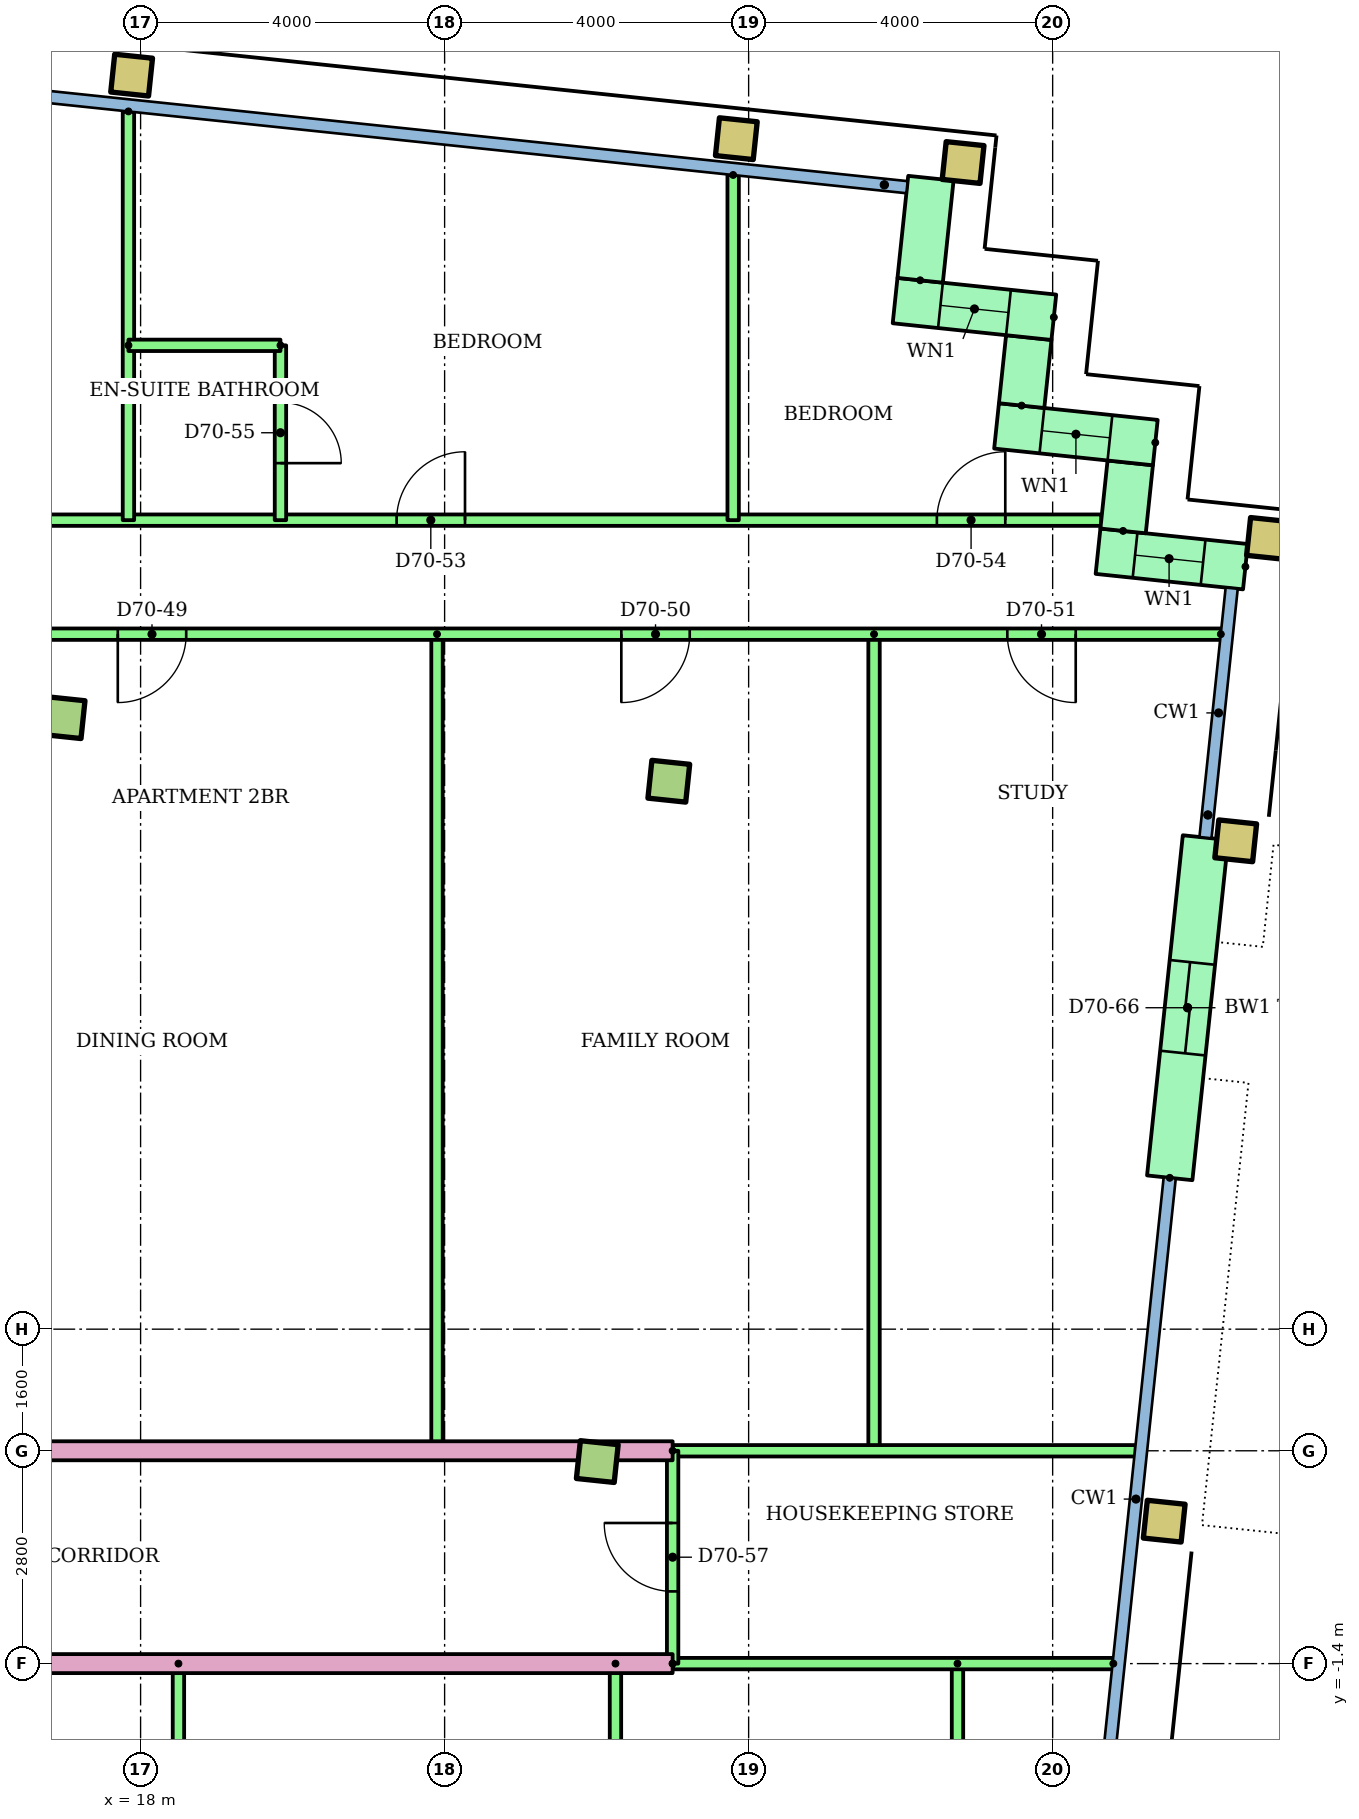
"""IFC4 building model, lengths in metres.
Left out: names, types, materials, properties, quantities, classifications, styles, units other than length and angle.
Written with IfcOpenShell. Run it as: python <this file> out.ifc"""

import sys

from ifc_helpers import new_model, si_unit, direction, frame, frame_2d, origin, origin_2d, place, context, subcontext, project, spatial, rectangle, hollow_rectangle, extrude, element, fill, save


model = new_model("IFC4")
c1 = context("Model", 3, precision=1e-05, world=origin(), true_north=direction((0.0, 1.0)))
c2 = subcontext(c1, "Body", "Model", "MODEL_VIEW")
j1 = project(units=[si_unit("LENGTHUNIT", "METRE"), si_unit("PLANEANGLEUNIT", "RADIAN")], contexts=[c1])
p1 = place(None, origin())
s1 = spatial("IfcSite", under=j1, at=p1, CompositionType="ELEMENT")
p2 = place(p1, origin())
s2 = spatial("IfcBuilding", under=s1, at=p2, CompositionType="ELEMENT")
p3 = place(p2, frame((0.0, 0.0, 269.1)))
s3 = spatial("IfcBuildingStorey", under=s2, at=p3, CompositionType="ELEMENT", Elevation=269.1)
p4 = place(p3, frame((24.009, 1.258, 0.0), z_axis=(0.0, 0.0, 1.0), x_axis=(0.994521895368, -0.104528463268, 0.0)))
e1 = element("IfcColumn", 1, at=p4, inside=s3, PredefinedType="COLUMN", context=c2, shape_type="SweptSolid", body=[
    extrude(rectangle(XDim=0.5, YDim=0.5, at=origin_2d()), origin(), (0.0, 0.0, 1.0), 3.2),
])
p5 = place(p3, frame((31.468, 0.474, 0.0), z_axis=(0.0, 0.0, 1.0), x_axis=(0.994521895368, -0.104528463268, 0.0)))
e2 = element("IfcColumn", 2, at=p5, inside=s3, PredefinedType="COLUMN", context=c2, shape_type="SweptSolid", body=[
    extrude(hollow_rectangle(XDim=0.5, YDim=0.5, WallThickness=0.025, at=origin_2d()), origin(), (0.0, 0.0, 1.0), 3.2),
])
for number, where, z_axis, x_axis in (
    (3, (16.993, 11.045, 0.0), (0.0, 0.0, 1.0), (0.995, -0.105, 0.0)),
    (4, (24.95, 10.209, 0.0), (0.0, 0.0, 1.0), (0.995, -0.105, 0.0)),
):
    element("IfcColumn", number, at=place(p3, frame(where, z_axis=z_axis, x_axis=x_axis)), inside=s3, PredefinedType="COLUMN", context=c2, shape_type="SweptSolid", body=[
        extrude(rectangle(XDim=0.5, YDim=0.5, at=origin_2d()), origin(), (0.0, 0.0, 1.0), 3.2),
    ])
for number, where, z_axis, x_axis in (
    (5, (32.409, 9.425, 0.0), (0.0, 0.0, 1.0), (0.995, -0.105, 0.0)),
    (6, (32.827, 13.403, 0.0), (0.0, 0.0, 1.0), (0.995, -0.105, 0.0)),
    (7, (17.882, 19.498, 0.0), (0.0, 0.0, 1.0), (0.995, -0.105, 0.0)),
    (8, (25.838, 18.662, 0.0), (0.0, 0.0, 1.0), (0.995, -0.105, 0.0)),
    (9, (28.822, 18.349, 0.0), (0.0, 0.0, 1.0), (0.995, -0.105, 0.0)),
):
    element("IfcColumn", number, at=place(p3, frame(where, z_axis=z_axis, x_axis=x_axis)), inside=s3, PredefinedType="COLUMN", context=c2, shape_type="SweptSolid", body=[
        extrude(hollow_rectangle(XDim=0.5, YDim=0.5, WallThickness=0.025, at=origin_2d()), origin(), (0.0, 0.0, 1.0), 3.2),
    ])
p6 = place(p3, frame((32.536, 13.031, 0.0), z_axis=(0.0, 0.0, 1.0), x_axis=(-0.994534226826, 0.104411070641, 0.0)))
e10 = element("IfcWall", 10, at=p6, inside=s3, PredefinedType="STANDARD", context=c2, shape_type="SweptSolid", body=[
    extrude(rectangle(XDim=1.95, YDim=0.6, at=frame_2d((0.975, 0.0))), origin(), (0.0, 0.0, 1.0), 2.92),
])
p7 = place(p6, frame((0.56, 0.0, 0.9)))
e11 = element("IfcOpeningElement", 11, at=p7, cuts=e10, PredefinedType="OPENING", context=c2, shape_type="SweptSolid", body=[
    extrude(rectangle(XDim=0.9, YDim=1.5, at=frame_2d((0.45, 0.75))), frame((0.0, 0.31, 0.0), z_axis=(0.0, -1.0, 0.0), x_axis=(1.0, 0.0, 0.0)), (0.0, 0.0, 1.0), 0.62),
])
p8 = place(p3, frame((30.927, 13.502, 0.0), z_axis=(0.0, 0.0, 1.0), x_axis=(0.104416541099, 0.994533652495, 0.0)))
e12 = element("IfcWall", 12, at=p8, inside=s3, PredefinedType="STANDARD", context=c2, shape_type="SweptSolid", body=[
    extrude(rectangle(XDim=0.9, YDim=0.6, at=frame_2d((0.45, 0.0))), origin(), (0.0, 0.0, 1.0), 2.92),
])
p9 = place(p3, frame((31.351, 14.664, 0.0), z_axis=(0.0, 0.0, 1.0), x_axis=(-0.994523910136, 0.104509292252, 0.0)))
e13 = element("IfcWall", 13, at=p9, inside=s3, PredefinedType="STANDARD", context=c2, shape_type="SweptSolid", body=[
    extrude(rectangle(XDim=2.1, YDim=0.6, at=frame_2d((1.05, 0.0))), origin(), (0.0, 0.0, 1.0), 2.92),
])
p10 = place(p9, frame((0.6, 0.0, 0.9)))
e14 = element("IfcOpeningElement", 14, at=p10, cuts=e13, PredefinedType="OPENING", context=c2, shape_type="SweptSolid", body=[
    extrude(rectangle(XDim=0.9, YDim=1.5, at=frame_2d((0.45, 0.75))), frame((0.0, 0.31, 0.0), z_axis=(0.0, -1.0, 0.0), x_axis=(1.0, 0.0, 0.0)), (0.0, 0.0, 1.0), 0.62),
])
p11 = place(p3, frame((29.592, 15.151, 0.0), z_axis=(0.0, 0.0, 1.0), x_axis=(0.104444712852, 0.994530694326, 0.0)))
e15 = element("IfcWall", 15, at=p11, inside=s3, PredefinedType="STANDARD", context=c2, shape_type="SweptSolid", body=[
    extrude(rectangle(XDim=0.9, YDim=0.6, at=frame_2d((0.45, 0.0))), origin(), (0.0, 0.0, 1.0), 2.92),
])
p12 = place(p3, frame((30.015, 16.312, 0.0), z_axis=(0.0, 0.0, 1.0), x_axis=(-0.994510548187, 0.104636368175, 0.0)))
e16 = element("IfcWall", 16, at=p12, inside=s3, PredefinedType="STANDARD", context=c2, shape_type="SweptSolid", body=[
    extrude(rectangle(XDim=2.1, YDim=0.6, at=frame_2d((1.05, 0.0))), origin(), (0.0, 0.0, 1.0), 2.92),
])
p13 = place(p12, frame((0.6, 0.0, 0.9)))
e17 = element("IfcOpeningElement", 17, at=p13, cuts=e16, PredefinedType="OPENING", context=c2, shape_type="SweptSolid", body=[
    extrude(rectangle(XDim=0.9, YDim=1.5, at=frame_2d((0.45, 0.75))), frame((0.0, 0.31, 0.0), z_axis=(0.0, -1.0, 0.0), x_axis=(1.0, 0.0, 0.0)), (0.0, 0.0, 1.0), 0.62),
])
p14 = place(p3, frame((28.257, 16.799, 0.0), z_axis=(0.0, 0.0, 1.0), x_axis=(0.104534153452, 0.994521297289, 0.0)))
e18 = element("IfcWall", 18, at=p14, inside=s3, PredefinedType="STANDARD", context=c2, shape_type="SweptSolid", body=[
    extrude(rectangle(XDim=1.35, YDim=0.6, at=frame_2d((0.675, 0.0))), origin(), (0.0, 0.0, 1.0), 2.92),
])
p15 = place(p3, frame((31.54, 4.991, 0.0), z_axis=(0.0, 0.0, 1.0), x_axis=(0.104546400045, 0.994520009974, 0.0)))
e19 = element("IfcWall", 19, at=p15, inside=s3, PredefinedType="STANDARD", context=c2, shape_type="SweptSolid", body=[
    extrude(rectangle(XDim=4.5, YDim=0.6, at=frame_2d((2.25, 0.0))), origin(), (0.0, 0.0, 1.0), 2.92),
])
p16 = place(p15, frame((1.65, 0.0, 0.0)))
e20 = element("IfcOpeningElement", 20, at=p16, cuts=e19, PredefinedType="OPENING", context=c2, shape_type="SweptSolid", body=[
    extrude(rectangle(XDim=1.2, YDim=2.1, at=frame_2d((0.6, 1.05))), frame((0.0, 0.31, 0.0), z_axis=(0.0, -1.0, 0.0), x_axis=(1.0, 0.0, 0.0)), (0.0, 0.0, 1.0), 0.62),
])
for number, where, z_axis, x_axis in (
    (21, (18.498, -1.4, 0.0), (0.0, 0.0, 1.0), (0.0, -1.0, 0.0)),
    (22, (24.248, -1.4, 0.0), (0.0, 0.0, 1.0), (0.0, -1.0, 0.0)),
    (23, (28.748, -1.4, 0.0), (0.0, 0.0, 1.0), (0.0, -1.0, 0.0)),
):
    element("IfcWall", number, at=place(p3, frame(where, z_axis=z_axis, x_axis=x_axis)), inside=s3, PredefinedType="PARTITIONING", context=c2, shape_type="SweptSolid", body=[
        extrude(rectangle(XDim=8.982, YDim=0.15, at=frame_2d((4.491, 0.0))), origin(), (0.0, 0.0, 1.0), 2.4),
    ])
p17 = place(p3, frame((25.0, -1.4, 0.0), z_axis=(0.0, 0.0, 1.0), x_axis=(-1.0, 0.0, 0.0)))
e24 = element("IfcWall", 24, at=p17, inside=s3, PredefinedType="PARTITIONING", context=c2, shape_type="SweptSolid", body=[
    extrude(rectangle(XDim=15.0, YDim=0.25, at=frame_2d((7.5, 0.0))), origin(), (0.0, 0.0, 1.0), 2.4),
])
p18 = place(p17, frame((9.658, 0.0, 0.0)))
e25 = element("IfcOpeningElement", 25, at=p18, cuts=e24, PredefinedType="OPENING", context=c2, shape_type="SweptSolid", body=[
    extrude(rectangle(XDim=0.9, YDim=2.1, at=frame_2d((0.45, 1.05))), frame((0.0, 0.135, 0.0), z_axis=(0.0, -1.0, 0.0), x_axis=(1.0, 0.0, 0.0)), (0.0, 0.0, 1.0), 0.27),
])
p19 = place(p3, frame((30.798, -1.4, 0.0), z_axis=(0.0, 0.0, 1.0), x_axis=(-1.0, 0.0, 0.0)))
e26 = element("IfcWall", 26, at=p19, inside=s3, PredefinedType="PARTITIONING", context=c2, shape_type="SweptSolid", body=[
    extrude(rectangle(XDim=5.798, YDim=0.15, at=frame_2d((2.899, 0.0))), origin(), (0.0, 0.0, 1.0), 2.4),
])
for number, where, z_axis, x_axis in (
    (27, (21.9, 12.143, 0.0), (0.0, 0.0, 1.0), (0.0, -1.0, 0.0)),
    (28, (27.65, 12.143, 0.0), (0.0, 0.0, 1.0), (0.0, -1.0, 0.0)),
):
    element("IfcWall", number, at=place(p3, frame(where, z_axis=z_axis, x_axis=x_axis)), inside=s3, PredefinedType="PARTITIONING", context=c2, shape_type="SweptSolid", body=[
        extrude(rectangle(XDim=10.743, YDim=0.15, at=frame_2d((5.372, 0.0))), origin(), (0.0, 0.0, 1.0), 2.4),
    ])
p20 = place(p3, frame((32.213, 12.143, 0.0), z_axis=(0.0, 0.0, 1.0), x_axis=(-1.0, 0.0, 0.0)))
e29 = element("IfcWall", 29, at=p20, inside=s3, PredefinedType="PARTITIONING", context=c2, shape_type="SweptSolid", body=[
    extrude(rectangle(XDim=20.213, YDim=0.15, at=frame_2d((10.106, 0.0))), origin(), (0.0, 0.0, 1.0), 2.4),
])
p21 = place(p20, frame((13.613, 0.0, 0.0)))
e30 = element("IfcOpeningElement", 30, at=p21, cuts=e29, PredefinedType="OPENING", context=c2, shape_type="SweptSolid", body=[
    extrude(rectangle(XDim=0.9, YDim=2.1, at=frame_2d((0.45, 1.05))), frame((0.0, 0.085, 0.0), z_axis=(0.0, -1.0, 0.0), x_axis=(1.0, 0.0, 0.0)), (0.0, 0.0, 1.0), 0.17),
])
p22 = place(p20, frame((6.988, 0.0, 0.0)))
e31 = element("IfcOpeningElement", 31, at=p22, cuts=e29, PredefinedType="OPENING", context=c2, shape_type="SweptSolid", body=[
    extrude(rectangle(XDim=0.9, YDim=2.1, at=frame_2d((0.45, 1.05))), frame((0.0, 0.085, 0.0), z_axis=(0.0, -1.0, 0.0), x_axis=(1.0, 0.0, 0.0)), (0.0, 0.0, 1.0), 0.17),
])
p23 = place(p20, frame((1.909, 0.0, 0.0)))
e32 = element("IfcOpeningElement", 32, at=p23, cuts=e29, PredefinedType="OPENING", context=c2, shape_type="SweptSolid", body=[
    extrude(rectangle(XDim=0.9, YDim=2.1, at=frame_2d((0.45, 1.05))), frame((0.0, 0.085, 0.0), z_axis=(0.0, -1.0, 0.0), x_axis=(1.0, 0.0, 0.0)), (0.0, 0.0, 1.0), 0.17),
])
p24 = place(p3, frame((10.0, 13.643, 0.0)))
e33 = element("IfcWall", 33, at=p24, inside=s3, PredefinedType="PARTITIONING", context=c2, shape_type="SweptSolid", body=[
    extrude(rectangle(XDim=20.641, YDim=0.15, at=frame_2d((10.32, 0.0))), origin(), (0.0, 0.0, 1.0), 2.4),
])
p25 = place(p24, frame((3.42, 0.0, 0.0)))
e34 = element("IfcOpeningElement", 34, at=p25, cuts=e33, PredefinedType="OPENING", context=c2, shape_type="SweptSolid", body=[
    extrude(rectangle(XDim=1.0, YDim=2.1, at=frame_2d((0.5, 1.05))), frame((0.0, 0.085, 0.0), z_axis=(0.0, -1.0, 0.0), x_axis=(1.0, 0.0, 0.0)), (0.0, 0.0, 1.0), 0.17),
])
p26 = place(p24, frame((11.368, 0.0, 0.0)))
e35 = element("IfcOpeningElement", 35, at=p26, cuts=e33, PredefinedType="OPENING", context=c2, shape_type="SweptSolid", body=[
    extrude(rectangle(XDim=0.9, YDim=2.1, at=frame_2d((0.45, 1.05))), frame((0.0, 0.085, 0.0), z_axis=(0.0, -1.0, 0.0), x_axis=(1.0, 0.0, 0.0)), (0.0, 0.0, 1.0), 0.17),
])
p27 = place(p24, frame((18.477, 0.0, 0.0)))
e36 = element("IfcOpeningElement", 36, at=p27, cuts=e33, PredefinedType="OPENING", context=c2, shape_type="SweptSolid", body=[
    extrude(rectangle(XDim=0.9, YDim=2.1, at=frame_2d((0.45, 1.05))), frame((0.0, 0.085, 0.0), z_axis=(0.0, -1.0, 0.0), x_axis=(1.0, 0.0, 0.0)), (0.0, 0.0, 1.0), 0.17),
])
p28 = place(p3, frame((17.84, 19.021, 0.0), z_axis=(0.0, 0.0, 1.0), x_axis=(0.0, -1.0, 0.0)))
e37 = element("IfcWall", 37, at=p28, inside=s3, PredefinedType="PARTITIONING", context=c2, shape_type="SweptSolid", body=[
    extrude(rectangle(XDim=5.378, YDim=0.15, at=frame_2d((2.689, 0.0))), origin(), (0.0, 0.0, 1.0), 2.4),
])
p29 = place(p3, frame((25.796, 18.185, 0.0), z_axis=(0.0, 0.0, 1.0), x_axis=(0.0, -1.0, 0.0)))
e38 = element("IfcWall", 38, at=p29, inside=s3, PredefinedType="PARTITIONING", context=c2, shape_type="SweptSolid", body=[
    extrude(rectangle(XDim=4.542, YDim=0.15, at=frame_2d((2.271, 0.0))), origin(), (0.0, 0.0, 1.0), 2.4),
])
p30 = place(p3, frame((19.84, 15.943, 0.0), z_axis=(0.0, 0.0, 1.0), x_axis=(0.0, -1.0, 0.0)))
e39 = element("IfcWall", 39, at=p30, inside=s3, PredefinedType="PARTITIONING", context=c2, shape_type="SweptSolid", body=[
    extrude(rectangle(XDim=2.3, YDim=0.15, at=frame_2d((1.15, 0.0))), origin(), (0.0, 0.0, 1.0), 2.4),
])
p31 = place(p30, frame((0.75, 0.0, 0.0)))
e40 = element("IfcOpeningElement", 40, at=p31, cuts=e39, PredefinedType="OPENING", context=c2, shape_type="SweptSolid", body=[
    extrude(rectangle(XDim=0.8, YDim=2.1, at=frame_2d((0.4, 1.05))), frame((0.0, 0.085, 0.0), z_axis=(0.0, -1.0, 0.0), x_axis=(1.0, 0.0, 0.0)), (0.0, 0.0, 1.0), 0.17),
])
p32 = place(p3, frame((17.84, 15.943, 0.0)))
e41 = element("IfcWall", 41, at=p32, inside=s3, PredefinedType="PARTITIONING", context=c2, shape_type="SweptSolid", body=[
    extrude(rectangle(XDim=2.0, YDim=0.15, at=frame_2d((1.0, 0.0))), origin(), (0.0, 0.0, 1.0), 2.4),
])
p33 = place(p3, frame((10.0, 1.4, 0.0)))
e42 = element("IfcWall", 42, at=p33, inside=s3, PredefinedType="PARTITIONING", context=c2, shape_type="SweptSolid", body=[
    extrude(rectangle(XDim=15.0, YDim=0.25, at=frame_2d((7.5, 0.0))), origin(), (0.0, 0.0, 1.0), 2.4),
])
p34 = place(p33, frame((0.5, 0.0, 0.0)))
e43 = element("IfcOpeningElement", 43, at=p34, cuts=e42, PredefinedType="OPENING", context=c2, shape_type="SweptSolid", body=[
    extrude(rectangle(XDim=1.0, YDim=2.1, at=frame_2d((0.5, 1.05))), frame((0.0, 0.135, 0.0), z_axis=(0.0, -1.0, 0.0), x_axis=(1.0, 0.0, 0.0)), (0.0, 0.0, 1.0), 0.27),
])
p35 = place(p3, frame((25.0, 1.4, 0.0)))
e44 = element("IfcWall", 44, at=p35, inside=s3, PredefinedType="PARTITIONING", context=c2, shape_type="SweptSolid", body=[
    extrude(rectangle(XDim=6.093, YDim=0.15, at=frame_2d((3.046, 0.0))), origin(), (0.0, 0.0, 1.0), 2.4),
])
p36 = place(p3, frame((25.0, -1.4, 0.0), z_axis=(0.0, 0.0, 1.0), x_axis=(0.0, 1.0, 0.0)))
e45 = element("IfcWall", 45, at=p36, inside=s3, PredefinedType="PARTITIONING", context=c2, shape_type="SweptSolid", body=[
    extrude(rectangle(XDim=2.8, YDim=0.15, at=frame_2d((1.4, 0.0))), origin(), (0.0, 0.0, 1.0), 2.4),
])
p37 = place(p36, frame((0.95, 0.0, 0.0)))
e46 = element("IfcOpeningElement", 46, at=p37, cuts=e45, PredefinedType="OPENING", context=c2, shape_type="SweptSolid", body=[
    extrude(rectangle(XDim=0.9, YDim=2.1, at=frame_2d((0.45, 1.05))), frame((0.0, 0.085, 0.0), z_axis=(0.0, -1.0, 0.0), x_axis=(1.0, 0.0, 0.0)), (0.0, 0.0, 1.0), 0.17),
])
p38 = place(p7, origin())
e47 = element("IfcWindow", 47, at=p38, inside=s3, PartitioningType="SINGLE_PANEL", PredefinedType="WINDOW", context=c2, shape_type="SweptSolid", body=[
    extrude(rectangle(XDim=0.9, YDim=1.5, at=frame_2d((0.45, 0.75))), frame((0.0, 0.03, 0.0), z_axis=(0.0, -1.0, 0.0), x_axis=(1.0, 0.0, 0.0)), (0.0, 0.0, 1.0), 0.06),
])
fill(e11, e47)
p39 = place(p10, origin())
e48 = element("IfcWindow", 48, at=p39, inside=s3, PartitioningType="SINGLE_PANEL", PredefinedType="WINDOW", context=c2, shape_type="SweptSolid", body=[
    extrude(rectangle(XDim=0.9, YDim=1.5, at=frame_2d((0.45, 0.75))), frame((0.0, 0.03, 0.0), z_axis=(0.0, -1.0, 0.0), x_axis=(1.0, 0.0, 0.0)), (0.0, 0.0, 1.0), 0.06),
])
fill(e14, e48)
p40 = place(p13, origin())
e49 = element("IfcWindow", 49, at=p40, inside=s3, PartitioningType="SINGLE_PANEL", PredefinedType="WINDOW", context=c2, shape_type="SweptSolid", body=[
    extrude(rectangle(XDim=0.9, YDim=1.5, at=frame_2d((0.45, 0.75))), frame((0.0, 0.03, 0.0), z_axis=(0.0, -1.0, 0.0), x_axis=(1.0, 0.0, 0.0)), (0.0, 0.0, 1.0), 0.06),
])
fill(e17, e49)
p41 = place(p21, origin())
e50 = element("IfcDoor", 50, at=p41, inside=s3, OperationType="SINGLE_SWING_RIGHT", PredefinedType="DOOR", context=c2, shape_type="SweptSolid", body=[
    extrude(rectangle(XDim=0.9, YDim=2.1, at=frame_2d((0.45, 1.05))), frame((0.0, 0.025, 0.0), z_axis=(0.0, -1.0, 0.0), x_axis=(1.0, 0.0, 0.0)), (0.0, 0.0, 1.0), 0.05),
])
fill(e30, e50)
p42 = place(p22, origin())
e51 = element("IfcDoor", 51, at=p42, inside=s3, OperationType="SINGLE_SWING_RIGHT", PredefinedType="DOOR", context=c2, shape_type="SweptSolid", body=[
    extrude(rectangle(XDim=0.9, YDim=2.1, at=frame_2d((0.45, 1.05))), frame((0.0, 0.025, 0.0), z_axis=(0.0, -1.0, 0.0), x_axis=(1.0, 0.0, 0.0)), (0.0, 0.0, 1.0), 0.05),
])
fill(e31, e51)
p43 = place(p23, origin())
e52 = element("IfcDoor", 52, at=p43, inside=s3, OperationType="SINGLE_SWING_LEFT", PredefinedType="DOOR", context=c2, shape_type="SweptSolid", body=[
    extrude(rectangle(XDim=0.9, YDim=2.1, at=frame_2d((0.45, 1.05))), frame((0.0, 0.025, 0.0), z_axis=(0.0, -1.0, 0.0), x_axis=(1.0, 0.0, 0.0)), (0.0, 0.0, 1.0), 0.05),
])
fill(e32, e52)
p44 = place(p26, origin())
e53 = element("IfcDoor", 53, at=p44, inside=s3, OperationType="SINGLE_SWING_RIGHT", PredefinedType="DOOR", context=c2, shape_type="SweptSolid", body=[
    extrude(rectangle(XDim=0.9, YDim=2.1, at=frame_2d((0.45, 1.05))), frame((0.0, 0.025, 0.0), z_axis=(0.0, -1.0, 0.0), x_axis=(1.0, 0.0, 0.0)), (0.0, 0.0, 1.0), 0.05),
])
fill(e35, e53)
p45 = place(p27, origin())
e54 = element("IfcDoor", 54, at=p45, inside=s3, OperationType="SINGLE_SWING_RIGHT", PredefinedType="DOOR", context=c2, shape_type="SweptSolid", body=[
    extrude(rectangle(XDim=0.9, YDim=2.1, at=frame_2d((0.45, 1.05))), frame((0.0, 0.025, 0.0), z_axis=(0.0, -1.0, 0.0), x_axis=(1.0, 0.0, 0.0)), (0.0, 0.0, 1.0), 0.05),
])
fill(e36, e54)
p46 = place(p31, origin())
e55 = element("IfcDoor", 55, at=p46, inside=s3, OperationType="SINGLE_SWING_RIGHT", PredefinedType="DOOR", context=c2, shape_type="SweptSolid", body=[
    extrude(rectangle(XDim=0.8, YDim=2.1, at=frame_2d((0.4, 1.05))), frame((0.0, 0.025, 0.0), z_axis=(0.0, -1.0, 0.0), x_axis=(1.0, 0.0, 0.0)), (0.0, 0.0, 1.0), 0.05),
])
fill(e40, e55)
p47 = place(p37, origin())
e56 = element("IfcDoor", 56, at=p47, inside=s3, OperationType="SINGLE_SWING_RIGHT", PredefinedType="DOOR", context=c2, shape_type="SweptSolid", body=[
    extrude(rectangle(XDim=0.9, YDim=2.1, at=frame_2d((0.45, 1.05))), frame((0.0, 0.025, 0.0), z_axis=(0.0, -1.0, 0.0), x_axis=(1.0, 0.0, 0.0)), (0.0, 0.0, 1.0), 0.05),
])
fill(e46, e56)
p48 = place(p16, origin())
e57 = element("IfcDoor", 57, at=p48, inside=s3, OperationType="SLIDING_TO_LEFT", PredefinedType="DOOR", context=c2, shape_type="SweptSolid", body=[
    extrude(rectangle(XDim=1.2, YDim=2.1, at=frame_2d((0.6, 1.05))), frame((0.0, 0.025, 0.0), z_axis=(0.0, -1.0, 0.0), x_axis=(1.0, 0.0, 0.0)), (0.0, 0.0, 1.0), 0.05),
])
fill(e20, e57)
save(model, sys.argv[1])
